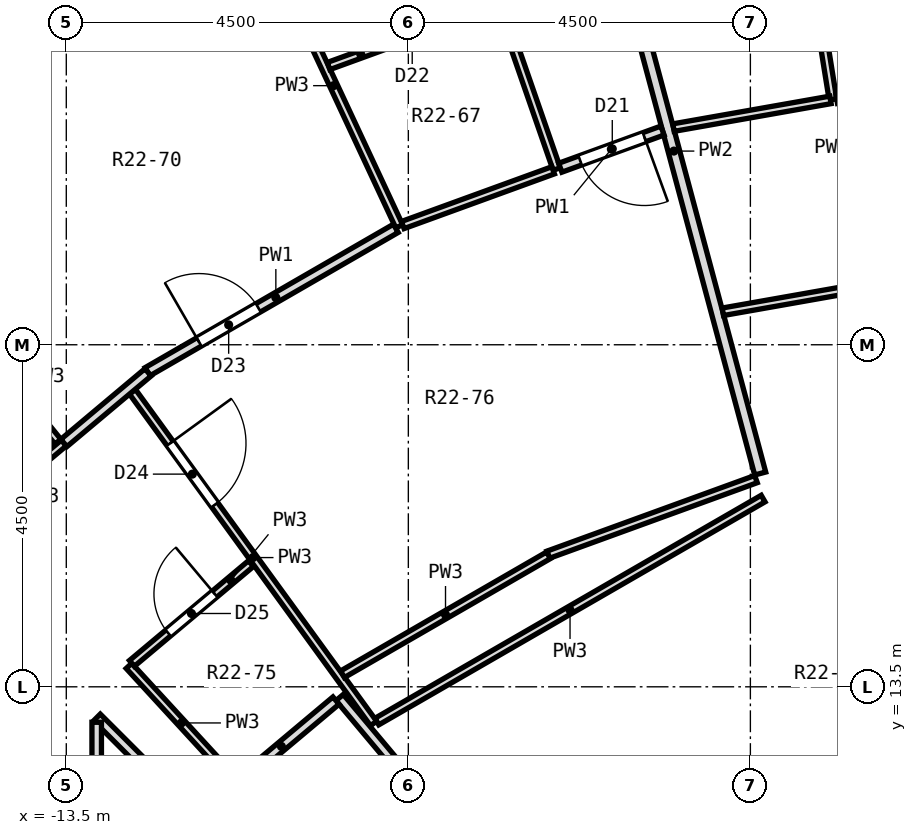
"""IFC4 building model, lengths in metres.
Left out: names, types, materials, properties, quantities, classifications, styles, units other than length and angle.
Written with IfcOpenShell. Run it as: python <this file> out.ifc"""

import sys

from ifc_helpers import new_model, si_unit, direction, frame, frame_2d, origin, place, context, subcontext, project, spatial, rectangle, extrude, element, fill, save


model = new_model("IFC4")
c1 = context("Model", 3, precision=1e-05, world=origin(), true_north=direction((0.0, 1.0)))
c2 = subcontext(c1, "Body", "Model", "MODEL_VIEW")
j1 = project(units=[si_unit("LENGTHUNIT", "METRE"), si_unit("PLANEANGLEUNIT", "RADIAN")], contexts=[c1])
p1 = place(None, origin())
s1 = spatial("IfcSite", under=j1, at=p1, CompositionType="ELEMENT")
p2 = place(p1, origin())
s2 = spatial("IfcBuilding", under=s1, at=p2, CompositionType="ELEMENT")
p3 = place(p2, frame((0.0, 0.0, 141.4)))
s3 = spatial("IfcBuildingStorey", under=s2, at=p3, CompositionType="ELEMENT", Elevation=141.4)
p4 = place(p3, frame((-3.779, 23.498, 0.0), z_axis=(0.0, 0.0, 1.0), x_axis=(0.15868179071, -0.987329777378, 0.0)))
e1 = element("IfcWall", 1, at=p4, inside=s3, PredefinedType="PARTITIONING", context=c2, shape_type="SweptSolid", body=[
    extrude(rectangle(XDim=2.3, YDim=0.1, at=frame_2d((1.15, 0.0))), origin(), (0.0, 0.0, 1.0), 2.8),
])
p5 = place(p3, frame((-6.643, 24.791, 0.0), z_axis=(0.0, 0.0, 1.0), x_axis=(0.258629569049, -0.965976576328, 0.0)))
e2 = element("IfcWall", 2, at=p5, inside=s3, PredefinedType="PARTITIONING", context=c2, shape_type="SweptSolid", body=[
    extrude(rectangle(XDim=8.784, YDim=0.15, at=frame_2d((4.392, 0.0))), origin(), (0.0, 0.0, 1.0), 2.8),
])
p6 = place(p3, frame((-7.802, 22.485, 0.0), z_axis=(0.0, 0.0, 1.0), x_axis=(0.327763034971, -0.944759965762, 0.0)))
e3 = element("IfcWall", 3, at=p6, inside=s3, PredefinedType="PARTITIONING", context=c2, shape_type="SweptSolid", body=[
    extrude(rectangle(XDim=2.3, YDim=0.1, at=frame_2d((1.15, 0.0))), origin(), (0.0, 0.0, 1.0), 2.8),
])
p7 = place(p3, frame((-10.847, 23.26, 0.0), z_axis=(0.0, 0.0, 1.0), x_axis=(0.422784035137, -0.906230467173, 0.0)))
e4 = element("IfcWall", 4, at=p7, inside=s3, PredefinedType="PARTITIONING", context=c2, shape_type="SweptSolid", body=[
    extrude(rectangle(XDim=4.085, YDim=0.1, at=frame_2d((2.042, 0.0))), origin(), (0.0, 0.0, 1.0), 2.8),
])
p8 = place(p3, frame((-12.629, 17.382, 0.0), z_axis=(0.0, 0.0, 1.0), x_axis=(0.587934886014, -0.808908257967, 0.0)))
e5 = element("IfcWall", 5, at=p8, inside=s3, PredefinedType="PARTITIONING", context=c2, shape_type="SweptSolid", body=[
    extrude(rectangle(XDim=5.395, YDim=0.1, at=frame_2d((2.698, 0.0))), origin(), (0.0, 0.0, 1.0), 2.8),
])
p9 = place(p8, frame((0.84, 0.0, 0.0)))
e6 = element("IfcOpeningElement", 6, at=p9, cuts=e5, PredefinedType="OPENING", context=c2, shape_type="SweptSolid", body=[
    extrude(rectangle(XDim=1.0, YDim=2.1, at=frame_2d((0.5, 1.05))), frame((0.0, 0.062, 0.0), z_axis=(0.0, -1.0, 0.0), x_axis=(1.0, 0.0, 0.0)), (0.0, 0.0, 1.0), 0.124),
])
p10 = place(p3, frame((-14.989, 18.419, 0.0), z_axis=(0.0, 0.0, 1.0), x_axis=(0.63124481093, -0.775583643893, 0.0)))
e7 = element("IfcWall", 7, at=p10, inside=s3, PredefinedType="PARTITIONING", context=c2, shape_type="SweptSolid", body=[
    extrude(rectangle(XDim=2.184, YDim=0.1, at=frame_2d((1.092, 0.0))), origin(), (0.0, 0.0, 1.0), 2.8),
])
p11 = place(p3, frame((-9.904, 13.359, 0.0), z_axis=(0.0, 0.0, 1.0), x_axis=(0.64260671374, -0.766196196451, 0.0)))
e8 = element("IfcWall", 8, at=p11, inside=s3, PredefinedType="PARTITIONING", context=c2, shape_type="SweptSolid", body=[
    extrude(rectangle(XDim=5.0, YDim=0.125, at=frame_2d((2.5, 0.0))), origin(), (0.0, 0.0, 1.0), 2.8),
])
p12 = place(p3, frame((-12.675, 13.776, 0.0), z_axis=(0.0, 0.0, 1.0), x_axis=(0.676672647076, -0.736284000029, 0.0)))
e9 = element("IfcWall", 9, at=p12, inside=s3, PredefinedType="PARTITIONING", context=c2, shape_type="SweptSolid", body=[
    extrude(rectangle(XDim=2.04, YDim=0.1, at=frame_2d((1.02, 0.0))), origin(), (0.0, 0.0, 1.0), 2.8),
])
p13 = place(p3, frame((-13.097, 13.097, 0.0), z_axis=(0.0, 0.0, 1.0), x_axis=(0.707106781187, -0.707106781187, 0.0)))
e10 = element("IfcWall", 10, at=p13, inside=s3, PredefinedType="PARTITIONING", context=c2, shape_type="SweptSolid", body=[
    extrude(rectangle(XDim=6.815, YDim=0.125, at=frame_2d((3.407, 0.0))), origin(), (0.0, 0.0, 1.0), 2.8),
])
p14 = place(p3, frame((-4.862, 18.434, 0.0), z_axis=(0.0, 0.0, 1.0), x_axis=(0.984777412926, 0.173820157031, 0.0)))
e11 = element("IfcWall", 11, at=p14, inside=s3, PredefinedType="PARTITIONING", context=c2, shape_type="SweptSolid", body=[
    extrude(rectangle(XDim=3.199, YDim=0.1, at=frame_2d((1.6, 0.0))), origin(), (0.0, 0.0, 1.0), 2.8),
])
p15 = place(p3, frame((-5.511, 20.857, 0.0), z_axis=(0.0, 0.0, 1.0), x_axis=(0.984775352835, 0.173831828066, 0.0)))
e12 = element("IfcWall", 12, at=p15, inside=s3, PredefinedType="PARTITIONING", context=c2, shape_type="SweptSolid", body=[
    extrude(rectangle(XDim=2.097, YDim=0.1, at=frame_2d((1.048, 0.0))), origin(), (0.0, 0.0, 1.0), 2.8),
])
p16 = place(p3, frame((-3.365, 21.236, 0.0), z_axis=(0.0, 0.0, 1.0), x_axis=(0.984839675328, 0.173467039809, 0.0)))
e13 = element("IfcWall", 13, at=p16, inside=s3, PredefinedType="PARTITIONING", context=c2, shape_type="SweptSolid", body=[
    extrude(rectangle(XDim=1.444, YDim=0.125, at=frame_2d((0.722, 0.0))), origin(), (0.0, 0.0, 1.0), 2.8),
])
p17 = place(p16, frame((0.278, 0.0, 0.0)))
e14 = element("IfcOpeningElement", 14, at=p17, cuts=e13, PredefinedType="OPENING", context=c2, shape_type="SweptSolid", body=[
    extrude(rectangle(XDim=0.9, YDim=2.1, at=frame_2d((0.45, 1.05))), frame((0.0, 0.074, 0.0), z_axis=(0.0, -1.0, 0.0), x_axis=(1.0, 0.0, 0.0)), (0.0, 0.0, 1.0), 0.149),
])
p18 = place(p3, frame((-7.161, 15.238, 0.0), z_axis=(0.0, 0.0, 1.0), x_axis=(0.939722354216, 0.341938440346, 0.0)))
e15 = element("IfcWall", 15, at=p18, inside=s3, PredefinedType="PARTITIONING", context=c2, shape_type="SweptSolid", body=[
    extrude(rectangle(XDim=2.909, YDim=0.1, at=frame_2d((1.455, 0.0))), origin(), (0.0, 0.0, 1.0), 2.8),
])
p19 = place(p3, frame((-9.073, 19.575, 0.0), z_axis=(0.0, 0.0, 1.0), x_axis=(0.939725675468, 0.341929312674, 0.0)))
e16 = element("IfcWall", 16, at=p19, inside=s3, PredefinedType="PARTITIONING", context=c2, shape_type="SweptSolid", body=[
    extrude(rectangle(XDim=2.105, YDim=0.1, at=frame_2d((1.052, 0.0))), origin(), (0.0, 0.0, 1.0), 2.8),
])
p20 = place(p3, frame((-7.001, 20.329, 0.0), z_axis=(0.0, 0.0, 1.0), x_axis=(0.939788441711, 0.341756762663, 0.0)))
e17 = element("IfcWall", 17, at=p20, inside=s3, PredefinedType="PARTITIONING", context=c2, shape_type="SweptSolid", body=[
    extrude(rectangle(XDim=1.431, YDim=0.125, at=frame_2d((0.715, 0.0))), origin(), (0.0, 0.0, 1.0), 2.8),
])
p21 = place(p20, frame((0.278, 0.0, 0.0)))
e18 = element("IfcOpeningElement", 18, at=p21, cuts=e17, PredefinedType="OPENING", context=c2, shape_type="SweptSolid", body=[
    extrude(rectangle(XDim=0.9, YDim=2.1, at=frame_2d((0.45, 1.05))), frame((0.0, 0.074, 0.0), z_axis=(0.0, -1.0, 0.0), x_axis=(1.0, 0.0, 0.0)), (0.0, 0.0, 1.0), 0.149),
])
p22 = place(p3, frame((-10.049, 21.667, 0.0), z_axis=(0.0, 0.0, 1.0), x_axis=(0.939662448837, 0.342103028699, 0.0)))
e19 = element("IfcWall", 19, at=p22, inside=s3, PredefinedType="PARTITIONING", context=c2, shape_type="SweptSolid", body=[
    extrude(rectangle(XDim=2.342, YDim=0.1, at=frame_2d((1.171, 0.0))), origin(), (0.0, 0.0, 1.0), 2.8),
])
p23 = place(p22, frame((0.771, 0.0, 0.0)))
e20 = element("IfcOpeningElement", 20, at=p23, cuts=e19, PredefinedType="OPENING", context=c2, shape_type="SweptSolid", body=[
    extrude(rectangle(XDim=0.8, YDim=2.1, at=frame_2d((0.4, 1.05))), frame((0.0, 0.062, 0.0), z_axis=(0.0, -1.0, 0.0), x_axis=(1.0, 0.0, 0.0)), (0.0, 0.0, 1.0), 0.124),
])
p24 = place(p3, frame((-9.414, 13.043, 0.0), z_axis=(0.0, 0.0, 1.0), x_axis=(0.866050468633, 0.499956583896, 0.0)))
e21 = element("IfcWall", 21, at=p24, inside=s3, PredefinedType="PARTITIONING", context=c2, shape_type="SweptSolid", body=[
    extrude(rectangle(XDim=5.867, YDim=0.1, at=frame_2d((2.934, 0.0))), origin(), (0.0, 0.0, 1.0), 2.8),
])
p25 = place(p3, frame((-9.866, 13.666, 0.0), z_axis=(0.0, 0.0, 1.0), x_axis=(0.866045268016, 0.499965592563, 0.0)))
e22 = element("IfcWall", 22, at=p25, inside=s3, PredefinedType="PARTITIONING", context=c2, shape_type="SweptSolid", body=[
    extrude(rectangle(XDim=3.129, YDim=0.1, at=frame_2d((1.564, 0.0))), origin(), (0.0, 0.0, 1.0), 2.8),
])
p26 = place(p3, frame((-12.432, 17.645, 0.0), z_axis=(0.0, 0.0, 1.0), x_axis=(0.866012062527, 0.500023107024, 0.0)))
e23 = element("IfcWall", 23, at=p26, inside=s3, PredefinedType="PARTITIONING", context=c2, shape_type="SweptSolid", body=[
    extrude(rectangle(XDim=3.772, YDim=0.125, at=frame_2d((1.886, 0.0))), origin(), (0.0, 0.0, 1.0), 2.8),
])
p27 = place(p26, frame((0.783, 0.0, 0.0)))
e24 = element("IfcOpeningElement", 24, at=p27, cuts=e23, PredefinedType="OPENING", context=c2, shape_type="SweptSolid", body=[
    extrude(rectangle(XDim=0.9, YDim=2.1, at=frame_2d((0.45, 1.05))), frame((0.0, 0.074, 0.0), z_axis=(0.0, -1.0, 0.0), x_axis=(1.0, 0.0, 0.0)), (0.0, 0.0, 1.0), 0.149),
])
p28 = place(p3, frame((-11.388, 12.114, 0.0), z_axis=(0.0, 0.0, 1.0), x_axis=(0.766199817297, 0.642602396489, 0.0)))
e25 = element("IfcWall", 25, at=p28, inside=s3, PredefinedType="PARTITIONING", context=c2, shape_type="SweptSolid", body=[
    extrude(rectangle(XDim=1.875, YDim=0.125, at=frame_2d((0.937, 0.0))), origin(), (0.0, 0.0, 1.0), 2.8),
])
p29 = place(p3, frame((-12.637, 13.808, 0.0), z_axis=(0.0, 0.0, 1.0), x_axis=(0.766269322056, 0.64251951416, 0.0)))
e26 = element("IfcWall", 26, at=p29, inside=s3, PredefinedType="PARTITIONING", context=c2, shape_type="SweptSolid", body=[
    extrude(rectangle(XDim=2.044, YDim=0.1, at=frame_2d((1.022, 0.0))), origin(), (0.0, 0.0, 1.0), 2.8),
])
p30 = place(p29, frame((0.622, 0.0, 0.0)))
e27 = element("IfcOpeningElement", 27, at=p30, cuts=e26, PredefinedType="OPENING", context=c2, shape_type="SweptSolid", body=[
    extrude(rectangle(XDim=0.8, YDim=2.1, at=frame_2d((0.4, 1.05))), frame((0.0, 0.062, 0.0), z_axis=(0.0, -1.0, 0.0), x_axis=(1.0, 0.0, 0.0)), (0.0, 0.0, 1.0), 0.124),
])
p31 = place(p3, frame((-15.22, 15.292, 0.0), z_axis=(0.0, 0.0, 1.0), x_axis=(0.766073622953, 0.642752832911, 0.0)))
e28 = element("IfcWall", 28, at=p31, inside=s3, PredefinedType="PARTITIONING", context=c2, shape_type="SweptSolid", body=[
    extrude(rectangle(XDim=2.203, YDim=0.1, at=frame_2d((1.102, 0.0))), origin(), (0.0, 0.0, 1.0), 2.8),
])
p32 = place(p3, frame((-13.532, 16.708, 0.0), z_axis=(0.0, 0.0, 1.0), x_axis=(0.766167387458, 0.642641061866, 0.0)))
e29 = element("IfcWall", 29, at=p32, inside=s3, PredefinedType="PARTITIONING", context=c2, shape_type="SweptSolid", body=[
    extrude(rectangle(XDim=1.445, YDim=0.125, at=frame_2d((0.722, 0.0))), origin(), (0.0, 0.0, 1.0), 2.8),
])
p33 = place(p3, frame((-13.1, 9.4, 0.0), z_axis=(0.0, 0.0, 1.0), x_axis=(0.0, 1.0, 0.0)))
e30 = element("IfcWall", 30, at=p33, inside=s3, PredefinedType="PARTITIONING", context=c2, shape_type="SweptSolid", body=[
    extrude(rectangle(XDim=3.634, YDim=0.125, at=frame_2d((1.817, 0.0))), origin(), (0.0, 0.0, 1.0), 2.8),
])
p34 = place(p33, frame((1.285, 0.0, 0.0)))
e31 = element("IfcOpeningElement", 31, at=p34, cuts=e30, PredefinedType="OPENING", context=c2, shape_type="SweptSolid", body=[
    extrude(rectangle(XDim=1.0, YDim=2.1, at=frame_2d((0.5, 1.05))), frame((0.0, 0.074, 0.0), z_axis=(0.0, -1.0, 0.0), x_axis=(1.0, 0.0, 0.0)), (0.0, 0.0, 1.0), 0.149),
])
p35 = place(p21, frame((0.9, 0.0, 0.0), z_axis=(0.0, 0.0, 1.0), x_axis=(-1.0, 0.0, 0.0)))
e32 = element("IfcDoor", 32, at=p35, inside=s3, OperationType="SINGLE_SWING_LEFT", PredefinedType="DOOR", context=c2, shape_type="SweptSolid", body=[
    extrude(rectangle(XDim=0.9, YDim=2.1, at=frame_2d((0.45, 1.05))), frame((0.0, 0.025, 0.0), z_axis=(0.0, -1.0, 0.0), x_axis=(1.0, 0.0, 0.0)), (0.0, 0.0, 1.0), 0.05),
])
fill(e18, e32)
p36 = place(p27, origin())
e33 = element("IfcDoor", 33, at=p36, inside=s3, OperationType="SINGLE_SWING_LEFT", PredefinedType="DOOR", context=c2, shape_type="SweptSolid", body=[
    extrude(rectangle(XDim=0.9, YDim=2.1, at=frame_2d((0.45, 1.05))), frame((0.0, 0.025, 0.0), z_axis=(0.0, -1.0, 0.0), x_axis=(1.0, 0.0, 0.0)), (0.0, 0.0, 1.0), 0.05),
])
fill(e24, e33)
p37 = place(p9, origin())
e34 = element("IfcDoor", 34, at=p37, inside=s3, OperationType="SINGLE_SWING_LEFT", PredefinedType="DOOR", context=c2, shape_type="SweptSolid", body=[
    extrude(rectangle(XDim=1.0, YDim=2.1, at=frame_2d((0.5, 1.05))), frame((0.0, 0.025, 0.0), z_axis=(0.0, -1.0, 0.0), x_axis=(1.0, 0.0, 0.0)), (0.0, 0.0, 1.0), 0.05),
])
fill(e6, e34)
p38 = place(p30, origin())
e35 = element("IfcDoor", 35, at=p38, inside=s3, OperationType="SINGLE_SWING_RIGHT", PredefinedType="DOOR", context=c2, shape_type="SweptSolid", body=[
    extrude(rectangle(XDim=0.8, YDim=2.1, at=frame_2d((0.4, 1.05))), frame((0.0, 0.025, 0.0), z_axis=(0.0, -1.0, 0.0), x_axis=(1.0, 0.0, 0.0)), (0.0, 0.0, 1.0), 0.05),
])
fill(e27, e35)
save(model, sys.argv[1])
